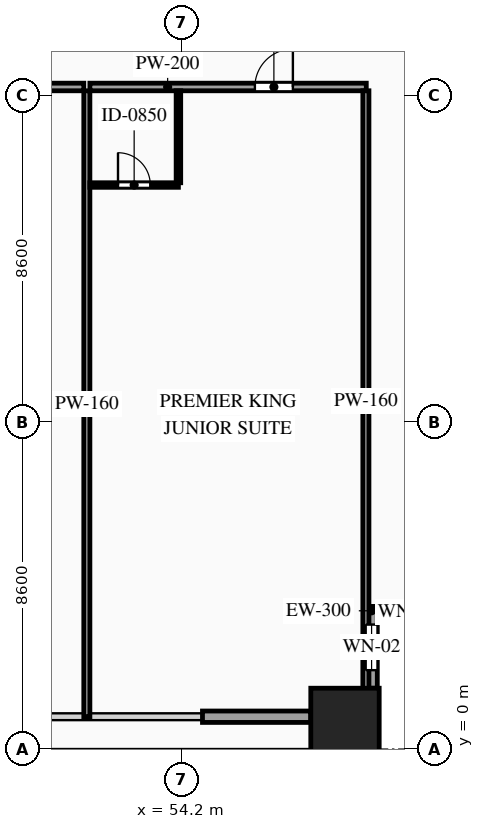
"""IFC4 building model, lengths in metres.
Left out: names, types, materials, properties, quantities, classifications, styles, units other than length and angle.
Written with IfcOpenShell. Run it as: python <this file> out.ifc"""

import sys

from ifc_helpers import new_model, si_unit, direction, frame, frame_2d, origin, origin_2d, place, context, subcontext, project, spatial, rectangle, hollow_rectangle, extrude, source, transform, mapped, element, fill, save


model = new_model("IFC4")
c1 = context("Model", 3, precision=1e-05, world=origin(), true_north=direction((0.0, 1.0)))
c2 = subcontext(c1, "Body", "Model", "MODEL_VIEW")
j1 = project(units=[si_unit("LENGTHUNIT", "METRE"), si_unit("PLANEANGLEUNIT", "RADIAN")], contexts=[c1])
p1 = place(None, origin())
s1 = spatial("IfcSite", under=j1, at=p1, CompositionType="ELEMENT")
p2 = place(p1, origin())
s2 = spatial("IfcBuilding", under=s1, at=p2, CompositionType="ELEMENT")
p3 = place(p2, frame((0.0, 0.0, 30.6)))
s3 = spatial("IfcBuildingStorey", under=s2, at=p3, CompositionType="ELEMENT", Elevation=30.6)
m1 = source(origin(), c2, "Body", "SweptSolid", [
    extrude(hollow_rectangle(XDim=1.8, YDim=1.8, WallThickness=0.08, at=origin_2d()), origin(), (0.0, 0.0, 1.0), 3.6),
])
p4 = place(p3, frame((58.5, 0.7, 0.0), z_axis=(0.0, 0.0, 1.0), x_axis=(1.0, 0.0, 0.0)))
e1 = element("IfcColumn", 1, at=p4, inside=s3, PredefinedType="COLUMN", context=c2, shape_type="MappedRepresentation", body=[
    mapped(m1, transform((0.0, 0.0, 0.0), scale=1.0)),
])
p5 = place(p3, frame((59.05, 3.6, 0.0), z_axis=(0.0, 0.0, 1.0), x_axis=(1.0, 0.0, 0.0)))
e2 = element("IfcWall", 2, at=p5, inside=s3, PredefinedType="SOLIDWALL", context=c2, shape_type="SweptSolid", body=[
    extrude(rectangle(XDim=2.15, YDim=0.3, at=frame_2d((1.075, 0.0))), origin(), (0.0, 0.0, 1.0), 3.38),
])
p6 = place(p5, frame((0.625, 0.0, 0.85)))
e3 = element("IfcOpeningElement", 3, at=p6, cuts=e2, PredefinedType="OPENING", context=c2, shape_type="SweptSolid", body=[
    extrude(rectangle(XDim=0.9, YDim=1.5, at=frame_2d((0.45, 0.75))), frame((0.0, 0.165, 0.0), z_axis=(0.0, -1.0, 0.0), x_axis=(1.0, 0.0, 0.0)), (0.0, 0.0, 1.0), 0.33),
])
p7 = place(p3, frame((59.2, 1.6, 0.0), z_axis=(0.0, 0.0, 1.0), x_axis=(0.0, 1.0, 0.0)))
e4 = element("IfcWall", 4, at=p7, inside=s3, PredefinedType="SOLIDWALL", context=c2, shape_type="SweptSolid", body=[
    extrude(rectangle(XDim=2.15, YDim=0.3, at=frame_2d((1.075, 0.0))), origin(), (0.0, 0.0, 1.0), 3.38),
])
p8 = place(p7, frame((0.475, 0.0, 0.85)))
e5 = element("IfcOpeningElement", 5, at=p8, cuts=e4, PredefinedType="OPENING", context=c2, shape_type="SweptSolid", body=[
    extrude(rectangle(XDim=1.2, YDim=2.1, at=frame_2d((0.6, 1.05))), frame((0.0, 0.165, 0.0), z_axis=(0.0, -1.0, 0.0), x_axis=(1.0, 0.0, 0.0)), (0.0, 0.0, 1.0), 0.33),
])
m2 = source(origin(), c2, "Body", "SweptSolid", [
    extrude(rectangle(XDim=2.85, YDim=0.3, at=frame_2d((1.425, 0.0))), origin(), (0.0, 0.0, 1.0), 2.775),
])
p9 = place(p3, frame((54.75, 0.85, 0.0), z_axis=(0.0, 0.0, 1.0), x_axis=(1.0, 0.0, 0.0)))
e6 = element("IfcWall", 6, at=p9, inside=s3, PredefinedType="SOLIDWALL", context=c2, shape_type="MappedRepresentation", body=[
    mapped(m2, transform((0.0, 0.0, 0.0), scale=1.0)),
])
p10 = place(p3, frame((44.433, 17.42, 0.0), z_axis=(0.0, 0.0, 1.0), x_axis=(1.0, 0.0, 0.0)))
e7 = element("IfcWall", 7, at=p10, inside=s3, PredefinedType="PARTITIONING", context=c2, shape_type="SweptSolid", body=[
    extrude(rectangle(XDim=7.194, YDim=0.2, at=frame_2d((3.597, 0.0))), origin(), (0.0, 0.0, 1.0), 3.38),
])
p11 = place(p10, frame((4.302, 0.0, 0.0)))
e8 = element("IfcOpeningElement", 8, at=p11, cuts=e7, PredefinedType="OPENING", context=c2, shape_type="SweptSolid", body=[
    extrude(rectangle(XDim=1.0, YDim=2.2, at=frame_2d((0.5, 1.1))), frame((0.0, 0.115, 0.0), z_axis=(0.0, -1.0, 0.0), x_axis=(1.0, 0.0, 0.0)), (0.0, 0.0, 1.0), 0.23),
])
m3 = source(origin(), c2, "Body", "SweptSolid", [
    extrude(rectangle(XDim=16.47, YDim=0.16, at=frame_2d((8.235, 0.0))), origin(), (0.0, 0.0, 1.0), 3.38),
])
p12 = place(p3, frame((51.707, 0.85, 0.0), z_axis=(0.0, 0.0, 1.0), x_axis=(0.0, 1.0, 0.0)))
e9 = element("IfcWall", 9, at=p12, inside=s3, PredefinedType="PARTITIONING", context=c2, shape_type="MappedRepresentation", body=[
    mapped(m3, transform((0.0, 0.0, 0.0), scale=1.0)),
])
p13 = place(p3, frame((51.787, 17.42, 0.0), z_axis=(0.0, 0.0, 1.0), x_axis=(1.0, 0.0, 0.0)))
e10 = element("IfcWall", 10, at=p13, inside=s3, PredefinedType="PARTITIONING", context=c2, shape_type="SweptSolid", body=[
    extrude(rectangle(XDim=7.273, YDim=0.2, at=frame_2d((3.636, 0.0))), origin(), (0.0, 0.0, 1.0), 3.38),
])
p14 = place(p13, frame((4.342, 0.0, 0.0)))
e11 = element("IfcOpeningElement", 11, at=p14, cuts=e10, PredefinedType="OPENING", context=c2, shape_type="SweptSolid", body=[
    extrude(rectangle(XDim=1.0, YDim=2.2, at=frame_2d((0.5, 1.1))), frame((0.0, 0.115, 0.0), z_axis=(0.0, -1.0, 0.0), x_axis=(1.0, 0.0, 0.0)), (0.0, 0.0, 1.0), 0.23),
])
m4 = source(origin(), c2, "Body", "SweptSolid", [
    extrude(rectangle(XDim=16.32, YDim=0.16, at=frame_2d((8.16, 0.0))), origin(), (0.0, 0.0, 1.0), 3.38),
])
p15 = place(p3, frame((59.05, 1.0, 0.0), z_axis=(0.0, 0.0, 1.0), x_axis=(0.0, 1.0, 0.0)))
e12 = element("IfcWall", 12, at=p15, inside=s3, PredefinedType="PARTITIONING", context=c2, shape_type="MappedRepresentation", body=[
    mapped(m4, transform((0.0, 0.0, 0.0), scale=1.0)),
])
p16 = place(p3, frame((51.787, 14.84, 0.0), z_axis=(0.0, 0.0, 1.0), x_axis=(1.0, 0.0, 0.0)))
e13 = element("IfcWall", 13, at=p16, inside=s3, PredefinedType="PARTITIONING", context=c2, shape_type="SweptSolid", body=[
    extrude(rectangle(XDim=2.33, YDim=0.12, at=frame_2d((1.165, 0.0))), origin(), (0.0, 0.0, 1.0), 3.38),
])
p17 = place(p16, frame((0.74, 0.0, 0.0)))
e14 = element("IfcOpeningElement", 14, at=p17, cuts=e13, PredefinedType="OPENING", context=c2, shape_type="SweptSolid", body=[
    extrude(rectangle(XDim=0.85, YDim=2.1, at=frame_2d((0.425, 1.05))), frame((0.0, 0.075, 0.0), z_axis=(0.0, -1.0, 0.0), x_axis=(1.0, 0.0, 0.0)), (0.0, 0.0, 1.0), 0.15),
])
m5 = source(origin(), c2, "Body", "SweptSolid", [
    extrude(rectangle(XDim=2.42, YDim=0.12, at=frame_2d((1.21, 0.0))), origin(), (0.0, 0.0, 1.0), 3.38),
])
p18 = place(p3, frame((54.117, 14.9, 0.0), z_axis=(0.0, 0.0, 1.0), x_axis=(0.0, 1.0, 0.0)))
e15 = element("IfcWall", 15, at=p18, inside=s3, PredefinedType="PARTITIONING", context=c2, shape_type="MappedRepresentation", body=[
    mapped(m5, transform((0.0, 0.0, 0.0), scale=1.0)),
])
m6 = source(origin(), c2, "Body", "SweptSolid", [
    extrude(rectangle(XDim=0.9, YDim=1.5, at=frame_2d((0.45, 0.75))), frame((0.0, 0.03, 0.0), z_axis=(0.0, -1.0, 0.0), x_axis=(1.0, 0.0, 0.0)), (0.0, 0.0, 1.0), 0.06),
])
p19 = place(p6, origin())
e16 = element("IfcWindow", 16, at=p19, inside=s3, PartitioningType="SINGLE_PANEL", PredefinedType="WINDOW", context=c2, shape_type="MappedRepresentation", body=[
    mapped(m6, transform((0.0, 0.0, 0.0), scale=1.0)),
])
fill(e3, e16)
m7 = source(origin(), c2, "Body", "SweptSolid", [
    extrude(rectangle(XDim=1.2, YDim=2.1, at=frame_2d((0.6, 1.05))), frame((0.0, 0.03, 0.0), z_axis=(0.0, -1.0, 0.0), x_axis=(1.0, 0.0, 0.0)), (0.0, 0.0, 1.0), 0.06),
])
p20 = place(p8, origin())
e17 = element("IfcWindow", 17, at=p20, inside=s3, PartitioningType="SINGLE_PANEL", PredefinedType="WINDOW", context=c2, shape_type="MappedRepresentation", body=[
    mapped(m7, transform((0.0, 0.0, 0.0), scale=1.0)),
])
fill(e5, e17)
m8 = source(origin(), c2, "Body", "SweptSolid", [
    extrude(rectangle(XDim=1.0, YDim=2.2, at=frame_2d((0.5, 1.1))), frame((0.0, 0.025, 0.0), z_axis=(0.0, -1.0, 0.0), x_axis=(1.0, 0.0, 0.0)), (0.0, 0.0, 1.0), 0.05),
])
p21 = place(p14, origin())
e18 = element("IfcDoor", 18, at=p21, inside=s3, OperationType="SINGLE_SWING_RIGHT", PredefinedType="DOOR", context=c2, shape_type="MappedRepresentation", body=[
    mapped(m8, transform((0.0, 0.0, 0.0), scale=1.0)),
])
fill(e11, e18)
m9 = source(origin(), c2, "Body", "SweptSolid", [
    extrude(rectangle(XDim=0.85, YDim=2.1, at=frame_2d((0.425, 1.05))), frame((0.0, 0.025, 0.0), z_axis=(0.0, -1.0, 0.0), x_axis=(1.0, 0.0, 0.0)), (0.0, 0.0, 1.0), 0.05),
])
p22 = place(p17, origin())
e19 = element("IfcDoor", 19, at=p22, inside=s3, OperationType="SINGLE_SWING_LEFT", PredefinedType="DOOR", context=c2, shape_type="MappedRepresentation", body=[
    mapped(m9, transform((0.0, 0.0, 0.0), scale=1.0)),
])
fill(e14, e19)
save(model, sys.argv[1])
